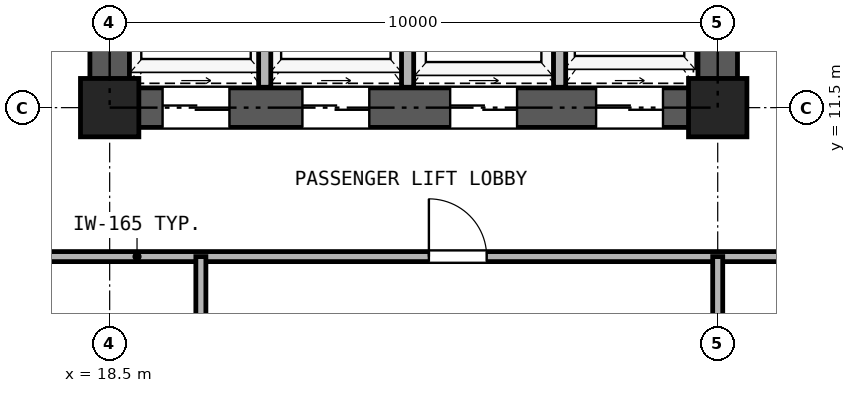
"""IFC4 building model, lengths in metres.
Left out: names, types, materials, properties, quantities, classifications, styles, units other than length and angle.
Written with IfcOpenShell. Run it as: python <this file> out.ifc"""

import sys

from ifc_helpers import new_model, si_unit, direction, frame, frame_2d, origin, origin_2d, place, context, subcontext, project, spatial, rectangle, hollow_rectangle, extrude, source, transform, mapped, element, fill, save


model = new_model("IFC4")
c1 = context("Model", 3, precision=1e-05, world=origin(), true_north=direction((0.0, 1.0)))
c2 = subcontext(c1, "Body", "Model", "MODEL_VIEW")
j1 = project(units=[si_unit("LENGTHUNIT", "METRE"), si_unit("PLANEANGLEUNIT", "RADIAN")], contexts=[c1])
p1 = place(None, origin())
s1 = spatial("IfcSite", under=j1, at=p1, CompositionType="ELEMENT")
p2 = place(p1, origin())
s2 = spatial("IfcBuilding", under=s1, at=p2, CompositionType="ELEMENT")
p3 = place(p2, frame((0.0, 0.0, 36.9)))
s3 = spatial("IfcBuildingStorey", under=s2, at=p3, CompositionType="ELEMENT", Elevation=36.9)
m1 = source(origin(), c2, "Body", "SweptSolid", [
    extrude(hollow_rectangle(XDim=0.96, YDim=0.96, WallThickness=0.06, at=origin_2d()), origin(), (0.0, 0.0, 1.0), 3.32),
])
for number, where, z_axis, x_axis in (
    (1, (18.5, 11.5, 0.0), (0.0, 0.0, 1.0), (1.0, 0.0, 0.0)),
    (2, (28.5, 11.5, 0.0), (0.0, 0.0, 1.0), (1.0, 0.0, 0.0)),
):
    element("IfcColumn", number, at=place(p3, frame(where, z_axis=z_axis, x_axis=x_axis)), inside=s3, PredefinedType="COLUMN", context=c2, shape_type="MappedRepresentation", body=[
        mapped(m1, transform((0.0, 0.0, 0.0), x_axis=(1.0, 0.0, 0.0), y_axis=(0.0, 1.0, 0.0), z_axis=(0.0, 0.0, 1.0), scale=1.0)),
    ])
p4 = place(p3, frame((18.175, 11.5, 0.0), z_axis=(0.0, 0.0, 1.0), x_axis=(1.0, 0.0, 0.0)))
e3 = element("IfcWall", 3, at=p4, inside=s3, PredefinedType="SHEAR", context=c2, shape_type="SweptSolid", body=[
    extrude(rectangle(XDim=10.65, YDim=0.65, at=frame_2d((5.325, 0.0))), origin(), (0.0, 0.0, 1.0), 3.32),
])
p5 = place(p4, frame((1.195, 0.0, 0.0)))
e4 = element("IfcOpeningElement", 4, at=p5, cuts=e3, PredefinedType="OPENING", context=c2, shape_type="SweptSolid", body=[
    extrude(rectangle(XDim=1.1, YDim=2.25, at=frame_2d((0.55, 1.125))), frame((0.0, 0.335, 0.0), z_axis=(0.0, -1.0, 0.0), x_axis=(1.0, 0.0, 0.0)), (0.0, 0.0, 1.0), 0.67),
])
p6 = place(p4, frame((3.495, 0.0, 0.0)))
e5 = element("IfcOpeningElement", 5, at=p6, cuts=e3, PredefinedType="OPENING", context=c2, shape_type="SweptSolid", body=[
    extrude(rectangle(XDim=1.1, YDim=2.25, at=frame_2d((0.55, 1.125))), frame((0.0, 0.335, 0.0), z_axis=(0.0, -1.0, 0.0), x_axis=(1.0, 0.0, 0.0)), (0.0, 0.0, 1.0), 0.67),
])
p7 = place(p4, frame((5.925, 0.0, 0.0)))
e6 = element("IfcOpeningElement", 6, at=p7, cuts=e3, PredefinedType="OPENING", context=c2, shape_type="SweptSolid", body=[
    extrude(rectangle(XDim=1.1, YDim=2.25, at=frame_2d((0.55, 1.125))), frame((0.0, 0.335, 0.0), z_axis=(0.0, -1.0, 0.0), x_axis=(1.0, 0.0, 0.0)), (0.0, 0.0, 1.0), 0.67),
])
p8 = place(p4, frame((8.325, 0.0, 0.0)))
e7 = element("IfcOpeningElement", 7, at=p8, cuts=e3, PredefinedType="OPENING", context=c2, shape_type="SweptSolid", body=[
    extrude(rectangle(XDim=1.1, YDim=2.25, at=frame_2d((0.55, 1.125))), frame((0.0, 0.335, 0.0), z_axis=(0.0, -1.0, 0.0), x_axis=(1.0, 0.0, 0.0)), (0.0, 0.0, 1.0), 0.67),
])
p9 = place(p3, frame((18.5, 11.825, 0.0), z_axis=(0.0, 0.0, 1.0), x_axis=(0.0, 1.0, 0.0)))
e8 = element("IfcWall", 8, at=p9, inside=s3, PredefinedType="SHEAR", context=c2, shape_type="SweptSolid", body=[
    extrude(rectangle(XDim=16.6, YDim=0.65, at=frame_2d((8.3, 0.0))), origin(), (0.0, 0.0, 1.0), 3.32),
])
p10 = place(p9, frame((7.325, 0.0, 0.0)))
e9 = element("IfcOpeningElement", 9, at=p10, cuts=e8, PredefinedType="OPENING", context=c2, shape_type="SweptSolid", body=[
    extrude(rectangle(XDim=1.15, YDim=2.2, at=frame_2d((0.575, 1.1))), frame((0.0, 0.335, 0.0), z_axis=(0.0, -1.0, 0.0), x_axis=(1.0, 0.0, 0.0)), (0.0, 0.0, 1.0), 0.67),
])
p11 = place(p3, frame((28.5, 11.825, 0.0), z_axis=(0.0, 0.0, 1.0), x_axis=(0.0, 1.0, 0.0)))
e10 = element("IfcWall", 10, at=p11, inside=s3, PredefinedType="SHEAR", context=c2, shape_type="SweptSolid", body=[
    extrude(rectangle(XDim=16.6, YDim=0.65, at=frame_2d((8.3, 0.0))), origin(), (0.0, 0.0, 1.0), 3.32),
])
p12 = place(p11, frame((7.325, 0.0, 0.0)))
e11 = element("IfcOpeningElement", 11, at=p12, cuts=e10, PredefinedType="OPENING", context=c2, shape_type="SweptSolid", body=[
    extrude(rectangle(XDim=1.15, YDim=2.2, at=frame_2d((0.575, 1.1))), frame((0.0, 0.335, 0.0), z_axis=(0.0, -1.0, 0.0), x_axis=(1.0, 0.0, 0.0)), (0.0, 0.0, 1.0), 0.67),
])
for number, where, z_axis, x_axis in (
    (12, (21.05, 11.835, 0.0), (0.0, 0.0, 1.0), (0.0, 1.0, 0.0)),
    (13, (23.4, 11.835, 0.0), (0.0, 0.0, 1.0), (0.0, 1.0, 0.0)),
    (14, (25.9, 11.835, 0.0), (0.0, 0.0, 1.0), (0.0, 1.0, 0.0)),
):
    element("IfcWall", number, at=place(p3, frame(where, z_axis=z_axis, x_axis=x_axis)), inside=s3, PredefinedType="PARTITIONING", context=c2, shape_type="SweptSolid", body=[
        extrude(rectangle(XDim=3.165, YDim=0.2, at=frame_2d((1.583, 0.0))), origin(), (0.0, 0.0, 1.0), 3.32),
    ])
p13 = place(p3, frame((7.4, 9.05, 0.0), z_axis=(0.0, 0.0, 1.0), x_axis=(1.0, 0.0, 0.0)))
e15 = element("IfcWall", 15, at=p13, inside=s3, PredefinedType="PARTITIONING", context=c2, shape_type="SweptSolid", body=[
    extrude(rectangle(XDim=32.2, YDim=0.165, at=frame_2d((16.1, 0.0))), origin(), (0.0, 0.0, 1.0), 3.32),
])
p14 = place(p13, frame((5.8, 0.0, 0.0)))
e16 = element("IfcOpeningElement", 16, at=p14, cuts=e15, PredefinedType="OPENING", context=c2, shape_type="SweptSolid", body=[
    extrude(rectangle(XDim=0.95, YDim=2.15, at=frame_2d((0.475, 1.075))), frame((0.0, 0.093, 0.0), z_axis=(0.0, -1.0, 0.0), x_axis=(1.0, 0.0, 0.0)), (0.0, 0.0, 1.0), 0.185),
])
p15 = place(p13, frame((16.35, 0.0, 0.0)))
e17 = element("IfcOpeningElement", 17, at=p15, cuts=e15, PredefinedType="OPENING", context=c2, shape_type="SweptSolid", body=[
    extrude(rectangle(XDim=0.95, YDim=2.15, at=frame_2d((0.475, 1.075))), frame((0.0, 0.093, 0.0), z_axis=(0.0, -1.0, 0.0), x_axis=(1.0, 0.0, 0.0)), (0.0, 0.0, 1.0), 0.185),
])
p16 = place(p13, frame((23.6, 0.0, 0.0)))
e18 = element("IfcOpeningElement", 18, at=p16, cuts=e15, PredefinedType="OPENING", context=c2, shape_type="SweptSolid", body=[
    extrude(rectangle(XDim=0.95, YDim=2.15, at=frame_2d((0.475, 1.075))), frame((0.0, 0.093, 0.0), z_axis=(0.0, -1.0, 0.0), x_axis=(1.0, 0.0, 0.0)), (0.0, 0.0, 1.0), 0.185),
])
p17 = place(p13, frame((27.95, 0.0, 0.0)))
e19 = element("IfcOpeningElement", 19, at=p17, cuts=e15, PredefinedType="OPENING", context=c2, shape_type="SweptSolid", body=[
    extrude(rectangle(XDim=0.92, YDim=2.1, at=frame_2d((0.46, 1.05))), frame((0.0, 0.093, 0.0), z_axis=(0.0, -1.0, 0.0), x_axis=(1.0, 0.0, 0.0)), (0.0, 0.0, 1.0), 0.185),
])
p18 = place(p13, frame((30.5, 0.0, 0.0)))
e20 = element("IfcOpeningElement", 20, at=p18, cuts=e15, PredefinedType="OPENING", context=c2, shape_type="SweptSolid", body=[
    extrude(rectangle(XDim=0.92, YDim=2.1, at=frame_2d((0.46, 1.05))), frame((0.0, 0.093, 0.0), z_axis=(0.0, -1.0, 0.0), x_axis=(1.0, 0.0, 0.0)), (0.0, 0.0, 1.0), 0.185),
])
p19 = place(p3, frame((20.0, 0.16, 0.0), z_axis=(0.0, 0.0, 1.0), x_axis=(0.0, 1.0, 0.0)))
e21 = element("IfcWall", 21, at=p19, inside=s3, PredefinedType="PARTITIONING", context=c2, shape_type="SweptSolid", body=[
    extrude(rectangle(XDim=8.89, YDim=0.165, at=frame_2d((4.445, 0.0))), origin(), (0.0, 0.0, 1.0), 3.32),
])
p20 = place(p3, frame((28.5, 0.16, 0.0), z_axis=(0.0, 0.0, 1.0), x_axis=(0.0, 1.0, 0.0)))
e22 = element("IfcWall", 22, at=p20, inside=s3, PredefinedType="PARTITIONING", context=c2, shape_type="SweptSolid", body=[
    extrude(rectangle(XDim=8.89, YDim=0.165, at=frame_2d((4.445, 0.0))), origin(), (0.0, 0.0, 1.0), 2.539),
])
p21 = place(p5, frame((1.1, 0.0, 0.0), z_axis=(0.0, 0.0, 1.0), x_axis=(-1.0, 0.0, 0.0)))
e23 = element("IfcDoor", 23, at=p21, inside=s3, OperationType="DOUBLE_DOOR_SLIDING", PredefinedType="DOOR", context=c2, shape_type="SweptSolid", body=[
    extrude(rectangle(XDim=1.1, YDim=2.25, at=frame_2d((0.55, 1.125))), frame((0.0, 0.025, 0.0), z_axis=(0.0, -1.0, 0.0), x_axis=(1.0, 0.0, 0.0)), (0.0, 0.0, 1.0), 0.05),
])
fill(e4, e23)
p22 = place(p6, frame((1.1, 0.0, 0.0), z_axis=(0.0, 0.0, 1.0), x_axis=(-1.0, 0.0, 0.0)))
e24 = element("IfcDoor", 24, at=p22, inside=s3, OperationType="DOUBLE_DOOR_SLIDING", PredefinedType="DOOR", context=c2, shape_type="SweptSolid", body=[
    extrude(rectangle(XDim=1.1, YDim=2.25, at=frame_2d((0.55, 1.125))), frame((0.0, 0.025, 0.0), z_axis=(0.0, -1.0, 0.0), x_axis=(1.0, 0.0, 0.0)), (0.0, 0.0, 1.0), 0.05),
])
fill(e5, e24)
p23 = place(p7, frame((1.1, 0.0, 0.0), z_axis=(0.0, 0.0, 1.0), x_axis=(-1.0, 0.0, 0.0)))
e25 = element("IfcDoor", 25, at=p23, inside=s3, OperationType="DOUBLE_DOOR_SLIDING", PredefinedType="DOOR", context=c2, shape_type="SweptSolid", body=[
    extrude(rectangle(XDim=1.1, YDim=2.25, at=frame_2d((0.55, 1.125))), frame((0.0, 0.025, 0.0), z_axis=(0.0, -1.0, 0.0), x_axis=(1.0, 0.0, 0.0)), (0.0, 0.0, 1.0), 0.05),
])
fill(e6, e25)
p24 = place(p8, frame((1.1, 0.0, 0.0), z_axis=(0.0, 0.0, 1.0), x_axis=(-1.0, 0.0, 0.0)))
e26 = element("IfcDoor", 26, at=p24, inside=s3, OperationType="DOUBLE_DOOR_SLIDING", PredefinedType="DOOR", context=c2, shape_type="SweptSolid", body=[
    extrude(rectangle(XDim=1.1, YDim=2.25, at=frame_2d((0.55, 1.125))), frame((0.0, 0.025, 0.0), z_axis=(0.0, -1.0, 0.0), x_axis=(1.0, 0.0, 0.0)), (0.0, 0.0, 1.0), 0.05),
])
fill(e7, e26)
p25 = place(p15, frame((0.95, 0.0, 0.0), z_axis=(0.0, 0.0, 1.0), x_axis=(-1.0, 0.0, 0.0)))
e27 = element("IfcDoor", 27, at=p25, inside=s3, OperationType="SINGLE_SWING_LEFT", PredefinedType="DOOR", context=c2, shape_type="SweptSolid", body=[
    extrude(rectangle(XDim=0.95, YDim=2.15, at=frame_2d((0.475, 1.075))), frame((0.0, 0.025, 0.0), z_axis=(0.0, -1.0, 0.0), x_axis=(1.0, 0.0, 0.0)), (0.0, 0.0, 1.0), 0.05),
])
fill(e17, e27)
save(model, sys.argv[1])
